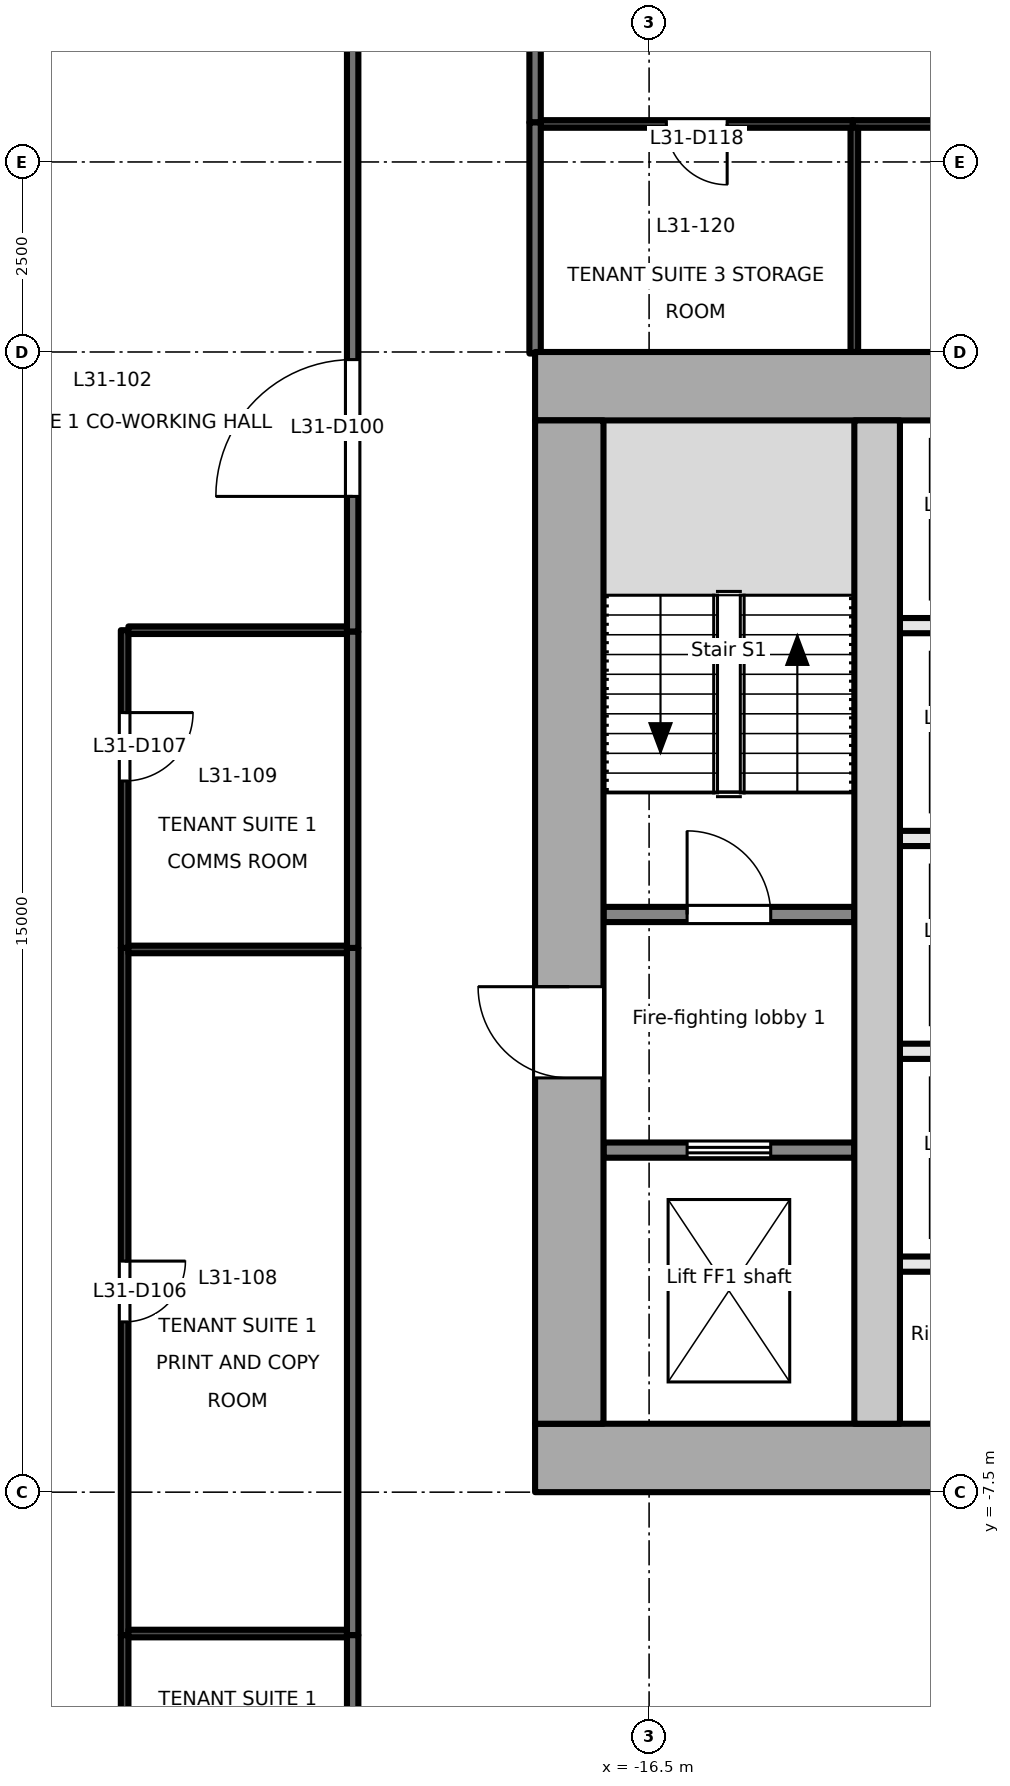
"""IFC4 building model, lengths in metres.
Left out: names, types, materials, properties, quantities, classifications, styles, units other than length and angle.
Written with IfcOpenShell. Run it as: python <this file> out.ifc"""

import sys

from ifc_helpers import new_model, si_unit, direction, frame, frame_2d, origin, place, context, subcontext, project, spatial, rectangle, extrude, element, fill, save


model = new_model("IFC4")
c1 = context("Model", 3, precision=1e-05, world=origin(), true_north=direction((0.0, 1.0)))
c2 = subcontext(c1, "Body", "Model", "MODEL_VIEW")
j1 = project(units=[si_unit("LENGTHUNIT", "METRE"), si_unit("PLANEANGLEUNIT", "RADIAN")], contexts=[c1])
p1 = place(None, origin())
s1 = spatial("IfcSite", under=j1, at=p1, CompositionType="ELEMENT")
p2 = place(p1, origin())
s2 = spatial("IfcBuilding", under=s1, at=p2, CompositionType="ELEMENT")
p3 = place(p2, frame((0.0, 0.0, 138.1)))
s3 = spatial("IfcBuildingStorey", under=s2, at=p3, CompositionType="ELEMENT", Elevation=138.1)
p4 = place(p3, frame((-18.0, -7.05, -0.2), z_axis=(0.0, 0.0, 1.0), x_axis=(1.0, 0.0, 0.0)))
e1 = element("IfcWall", 1, at=p4, inside=s3, PredefinedType="SHEAR", context=c2, shape_type="SweptSolid", body=[
    extrude(rectangle(XDim=36.0, YDim=0.9, at=frame_2d((18.0, 0.0))), origin(), (0.0, 0.0, 1.0), 4.0),
])
p5 = place(p4, frame((7.8, 0.0, 0.2)))
e2 = element("IfcOpeningElement", 2, at=p5, cuts=e1, PredefinedType="OPENING", context=c2, shape_type="SweptSolid", body=[
    extrude(rectangle(XDim=2.4, YDim=2.1, at=frame_2d((1.2, 1.05))), frame((0.0, 0.46, 0.0), z_axis=(0.0, -1.0, 0.0), x_axis=(1.0, 0.0, 0.0)), (0.0, 0.0, 1.0), 0.921),
])
p6 = place(p4, frame((17.4, 0.0, 0.2)))
e3 = element("IfcOpeningElement", 3, at=p6, cuts=e1, PredefinedType="OPENING", context=c2, shape_type="SweptSolid", body=[
    extrude(rectangle(XDim=1.2, YDim=2.1, at=frame_2d((0.6, 1.05))), frame((0.0, 0.46, 0.0), z_axis=(0.0, -1.0, 0.0), x_axis=(1.0, 0.0, 0.0)), (0.0, 0.0, 1.0), 0.921),
])
p7 = place(p4, frame((26.1, 0.0, 0.2)))
e4 = element("IfcOpeningElement", 4, at=p7, cuts=e1, PredefinedType="OPENING", context=c2, shape_type="SweptSolid", body=[
    extrude(rectangle(XDim=2.4, YDim=2.1, at=frame_2d((1.2, 1.05))), frame((0.0, 0.46, 0.0), z_axis=(0.0, -1.0, 0.0), x_axis=(1.0, 0.0, 0.0)), (0.0, 0.0, 1.0), 0.921),
])
p8 = place(p3, frame((-18.0, 7.05, -0.2), z_axis=(0.0, 0.0, 1.0), x_axis=(1.0, 0.0, 0.0)))
e5 = element("IfcWall", 5, at=p8, inside=s3, PredefinedType="SHEAR", context=c2, shape_type="SweptSolid", body=[
    extrude(rectangle(XDim=36.0, YDim=0.9, at=frame_2d((18.0, 0.0))), origin(), (0.0, 0.0, 1.0), 4.0),
])
p9 = place(p3, frame((-17.55, -6.6, -0.2), z_axis=(0.0, 0.0, 1.0), x_axis=(0.0, 1.0, 0.0)))
e6 = element("IfcWall", 6, at=p9, inside=s3, PredefinedType="SHEAR", context=c2, shape_type="SweptSolid", body=[
    extrude(rectangle(XDim=13.2, YDim=0.9, at=frame_2d((6.6, 0.0))), origin(), (0.0, 0.0, 1.0), 4.0),
])
p10 = place(p9, frame((4.55, 0.0, 0.2)))
e7 = element("IfcOpeningElement", 7, at=p10, cuts=e6, PredefinedType="OPENING", context=c2, shape_type="SweptSolid", body=[
    extrude(rectangle(XDim=1.2, YDim=2.1, at=frame_2d((0.6, 1.05))), frame((0.0, 0.46, 0.0), z_axis=(0.0, -1.0, 0.0), x_axis=(1.0, 0.0, 0.0)), (0.0, 0.0, 1.0), 0.921),
])
p11 = place(p3, frame((-13.5, -6.6, -0.2), z_axis=(0.0, 0.0, 1.0), x_axis=(0.0, 1.0, 0.0)))
e8 = element("IfcWall", 8, at=p11, inside=s3, PredefinedType="SHEAR", context=c2, shape_type="SweptSolid", body=[
    extrude(rectangle(XDim=13.2, YDim=0.6, at=frame_2d((6.6, 0.0))), origin(), (0.0, 0.0, 1.0), 4.0),
])
p12 = place(p3, frame((-17.1, -3.0, 0.0), z_axis=(0.0, 0.0, 1.0), x_axis=(1.0, 0.0, 0.0)))
e9 = element("IfcWall", 9, at=p12, inside=s3, PredefinedType="PARTITIONING", context=c2, shape_type="SweptSolid", body=[
    extrude(rectangle(XDim=3.3, YDim=0.2, at=frame_2d((1.65, 0.0))), origin(), (0.0, 0.0, 1.0), 3.8),
])
p13 = place(p12, frame((1.1, 0.0, 0.0)))
e10 = element("IfcOpeningElement", 10, at=p13, cuts=e9, PredefinedType="OPENING", context=c2, shape_type="SweptSolid", body=[
    extrude(rectangle(XDim=1.1, YDim=2.1, at=frame_2d((0.55, 1.05))), frame((0.0, 0.111, 0.0), z_axis=(0.0, -1.0, 0.0), x_axis=(1.0, 0.0, 0.0)), (0.0, 0.0, 1.0), 0.221),
])
p14 = place(p3, frame((-17.1, 0.1, 0.0), z_axis=(0.0, 0.0, 1.0), x_axis=(1.0, 0.0, 0.0)))
e11 = element("IfcWall", 11, at=p14, inside=s3, PredefinedType="PARTITIONING", context=c2, shape_type="SweptSolid", body=[
    extrude(rectangle(XDim=3.3, YDim=0.2, at=frame_2d((1.65, 0.0))), origin(), (0.0, 0.0, 1.0), 3.8),
])
p15 = place(p14, frame((1.1, 0.0, 0.0)))
e12 = element("IfcOpeningElement", 12, at=p15, cuts=e11, PredefinedType="OPENING", context=c2, shape_type="SweptSolid", body=[
    extrude(rectangle(XDim=1.1, YDim=2.1, at=frame_2d((0.55, 1.05))), frame((0.0, 0.111, 0.0), z_axis=(0.0, -1.0, 0.0), x_axis=(1.0, 0.0, 0.0)), (0.0, 0.0, 1.0), 0.221),
])
for number, where, z_axis, x_axis in (
    (13, (-13.2, -1.7, 0.0), (0.0, 0.0, 1.0), (1.0, 0.0, 0.0)),
    (14, (-13.2, 1.1, 0.0), (0.0, 0.0, 1.0), (1.0, 0.0, 0.0)),
    (15, (-13.2, 3.9, 0.0), (0.0, 0.0, 1.0), (1.0, 0.0, 0.0)),
    (16, (-13.2, -4.5, 0.0), (0.0, 0.0, 1.0), (1.0, 0.0, 0.0)),
):
    element("IfcWall", number, at=place(p3, frame(where, z_axis=z_axis, x_axis=x_axis)), inside=s3, PredefinedType="PARTITIONING", context=c2, shape_type="SweptSolid", body=[
        extrude(rectangle(XDim=2.3, YDim=0.2, at=frame_2d((1.15, 0.0))), origin(), (0.0, 0.0, 1.0), 3.8),
    ])
p16 = place(p3, frame((-20.4, 3.82, 0.0), z_axis=(0.0, 0.0, 1.0), x_axis=(0.0, 1.0, 0.0)))
e17 = element("IfcWall", 17, at=p16, inside=s3, PredefinedType="PARTITIONING", context=c2, shape_type="SweptSolid", body=[
    extrude(rectangle(XDim=8.42, YDim=0.15, at=frame_2d((4.21, 0.0))), origin(), (0.0, 0.0, 1.0), 3.3),
])
p17 = place(p16, frame((1.78, 0.0, 0.0)))
e18 = element("IfcOpeningElement", 18, at=p17, cuts=e17, PredefinedType="OPENING", context=c2, shape_type="SweptSolid", body=[
    extrude(rectangle(XDim=1.8, YDim=2.1, at=frame_2d((0.9, 1.05))), frame((0.0, 0.085, 0.0), z_axis=(0.0, -1.0, 0.0), x_axis=(1.0, 0.0, 0.0)), (0.0, 0.0, 1.0), 0.171),
])
p18 = place(p3, frame((-20.4, -12.34, 0.0), z_axis=(0.0, 0.0, 1.0), x_axis=(0.0, 1.0, 0.0)))
e19 = element("IfcWall", 19, at=p18, inside=s3, PredefinedType="PARTITIONING", context=c2, shape_type="SweptSolid", body=[
    extrude(rectangle(XDim=2.96, YDim=0.15, at=frame_2d((1.48, 0.0))), origin(), (0.0, 0.0, 1.0), 3.8),
])
p19 = place(p3, frame((-20.4, -9.38, 0.0), z_axis=(0.0, 0.0, 1.0), x_axis=(0.0, 1.0, 0.0)))
e20 = element("IfcWall", 20, at=p19, inside=s3, PredefinedType="PARTITIONING", context=c2, shape_type="SweptSolid", body=[
    extrude(rectangle(XDim=9.04, YDim=0.15, at=frame_2d((4.52, 0.0))), origin(), (0.0, 0.0, 1.0), 3.3),
])
p20 = place(p3, frame((-20.4, -0.34, 0.0), z_axis=(0.0, 0.0, 1.0), x_axis=(0.0, 1.0, 0.0)))
e21 = element("IfcWall", 21, at=p20, inside=s3, PredefinedType="PARTITIONING", context=c2, shape_type="SweptSolid", body=[
    extrude(rectangle(XDim=4.16, YDim=0.15, at=frame_2d((2.08, 0.0))), origin(), (0.0, 0.0, 1.0), 3.3),
])
p21 = place(p3, frame((-18.0, 12.24, 0.0), z_axis=(0.0, 0.0, 1.0), x_axis=(0.0, -1.0, 0.0)))
e22 = element("IfcWall", 22, at=p21, inside=s3, PredefinedType="PARTITIONING", context=c2, shape_type="SweptSolid", body=[
    extrude(rectangle(XDim=1.72, YDim=0.15, at=frame_2d((0.86, 0.0))), origin(), (0.0, 0.0, 1.0), 3.8),
])
p22 = place(p3, frame((-18.0, 10.52, 0.0), z_axis=(0.0, 0.0, 1.0), x_axis=(0.0, -1.0, 0.0)))
e23 = element("IfcWall", 23, at=p22, inside=s3, PredefinedType="PARTITIONING", context=c2, shape_type="SweptSolid", body=[
    extrude(rectangle(XDim=3.04, YDim=0.15, at=frame_2d((1.52, 0.0))), origin(), (0.0, 0.0, 1.0), 3.8),
])
p23 = place(p3, frame((-23.4, -9.38, 0.0), z_axis=(0.0, 0.0, 1.0), x_axis=(0.0, -1.0, 0.0)))
e24 = element("IfcWall", 24, at=p23, inside=s3, PredefinedType="PARTITIONING", context=c2, shape_type="SweptSolid", body=[
    extrude(rectangle(XDim=2.96, YDim=0.1, at=frame_2d((1.48, 0.0))), origin(), (0.0, 0.0, 1.0), 3.8),
])
p24 = place(p23, frame((1.412, 0.0, 0.0)))
e25 = element("IfcOpeningElement", 25, at=p24, cuts=e24, PredefinedType="OPENING", context=c2, shape_type="SweptSolid", body=[
    extrude(rectangle(XDim=0.8, YDim=2.1, at=frame_2d((0.4, 1.05))), frame((0.0, 0.061, 0.0), z_axis=(0.0, -1.0, 0.0), x_axis=(1.0, 0.0, 0.0)), (0.0, 0.0, 1.0), 0.121),
])
p25 = place(p3, frame((-23.4, -0.34, 0.0), z_axis=(0.0, 0.0, 1.0), x_axis=(0.0, -1.0, 0.0)))
e26 = element("IfcWall", 26, at=p25, inside=s3, PredefinedType="PARTITIONING", context=c2, shape_type="SweptSolid", body=[
    extrude(rectangle(XDim=9.04, YDim=0.1, at=frame_2d((4.52, 0.0))), origin(), (0.0, 0.0, 1.0), 3.3),
])
p26 = place(p25, frame((4.12, 0.0, 0.0)))
e27 = element("IfcOpeningElement", 27, at=p26, cuts=e26, PredefinedType="OPENING", context=c2, shape_type="SweptSolid", body=[
    extrude(rectangle(XDim=0.8, YDim=2.1, at=frame_2d((0.4, 1.05))), frame((0.0, 0.061, 0.0), z_axis=(0.0, -1.0, 0.0), x_axis=(1.0, 0.0, 0.0)), (0.0, 0.0, 1.0), 0.121),
])
p27 = place(p3, frame((-23.4, 3.84, 0.0), z_axis=(0.0, 0.0, 1.0), x_axis=(0.0, -1.0, 0.0)))
e28 = element("IfcWall", 28, at=p27, inside=s3, PredefinedType="PARTITIONING", context=c2, shape_type="SweptSolid", body=[
    extrude(rectangle(XDim=4.18, YDim=0.1, at=frame_2d((2.09, 0.0))), origin(), (0.0, 0.0, 1.0), 3.3),
])
p28 = place(p27, frame((1.084, 0.0, 0.0)))
e29 = element("IfcOpeningElement", 29, at=p28, cuts=e28, PredefinedType="OPENING", context=c2, shape_type="SweptSolid", body=[
    extrude(rectangle(XDim=0.9, YDim=2.1, at=frame_2d((0.45, 1.05))), frame((0.0, 0.061, 0.0), z_axis=(0.0, -1.0, 0.0), x_axis=(1.0, 0.0, 0.0)), (0.0, 0.0, 1.0), 0.121),
])
for number, where, z_axis, x_axis in (
    (30, (-20.475, 3.84, 0.0), (0.0, 0.0, 1.0), (-1.0, 0.0, 0.0)),
    (31, (-23.35, -9.36, 0.0), (0.0, 0.0, 1.0), (1.0, 0.0, 0.0)),
    (32, (-23.35, -0.36, 0.0), (0.0, 0.0, 1.0), (1.0, 0.0, 0.0)),
):
    element("IfcWall", number, at=place(p3, frame(where, z_axis=z_axis, x_axis=x_axis)), inside=s3, PredefinedType="PARTITIONING", context=c2, shape_type="SweptSolid", body=[
        extrude(rectangle(XDim=2.875, YDim=0.1, at=frame_2d((1.438, 0.0))), origin(), (0.0, 0.0, 1.0), 3.8),
    ])
p29 = place(p3, frame((-13.82, 10.5, 0.0), z_axis=(0.0, 0.0, 1.0), x_axis=(-1.0, 0.0, 0.0)))
e33 = element("IfcWall", 33, at=p29, inside=s3, PredefinedType="PARTITIONING", context=c2, shape_type="SweptSolid", body=[
    extrude(rectangle(XDim=4.105, YDim=0.1, at=frame_2d((2.052, 0.0))), origin(), (0.0, 0.0, 1.0), 3.8),
])
p30 = place(p29, frame((1.653, 0.0, 0.0)))
e34 = element("IfcOpeningElement", 34, at=p30, cuts=e33, PredefinedType="OPENING", context=c2, shape_type="SweptSolid", body=[
    extrude(rectangle(XDim=0.8, YDim=2.1, at=frame_2d((0.4, 1.05))), frame((0.0, 0.061, 0.0), z_axis=(0.0, -1.0, 0.0), x_axis=(1.0, 0.0, 0.0)), (0.0, 0.0, 1.0), 0.121),
])
p31 = place(p3, frame((-5.98, 10.5, 0.0), z_axis=(0.0, 0.0, 1.0), x_axis=(-1.0, 0.0, 0.0)))
e35 = element("IfcWall", 35, at=p31, inside=s3, PredefinedType="PARTITIONING", context=c2, shape_type="SweptSolid", body=[
    extrude(rectangle(XDim=7.84, YDim=0.1, at=frame_2d((3.92, 0.0))), origin(), (0.0, 0.0, 1.0), 3.5),
])
p32 = place(p31, frame((2.182, 0.0, 0.0)))
e36 = element("IfcOpeningElement", 36, at=p32, cuts=e35, PredefinedType="OPENING", context=c2, shape_type="SweptSolid", body=[
    extrude(rectangle(XDim=0.9, YDim=2.1, at=frame_2d((0.45, 1.05))), frame((0.0, 0.061, 0.0), z_axis=(0.0, -1.0, 0.0), x_axis=(1.0, 0.0, 0.0)), (0.0, 0.0, 1.0), 0.121),
])
p33 = place(p3, frame((-13.8, 10.45, 0.0), z_axis=(0.0, 0.0, 1.0), x_axis=(0.0, -1.0, 0.0)))
e37 = element("IfcWall", 37, at=p33, inside=s3, PredefinedType="PARTITIONING", context=c2, shape_type="SweptSolid", body=[
    extrude(rectangle(XDim=2.95, YDim=0.1, at=frame_2d((1.475, 0.0))), origin(), (0.0, 0.0, 1.0), 3.8),
])
p34 = place(p13, origin())
e38 = element("IfcDoor", 38, at=p34, inside=s3, OperationType="DOUBLE_DOOR_SLIDING", PredefinedType="DOOR", context=c2, shape_type="SweptSolid", body=[
    extrude(rectangle(XDim=1.1, YDim=2.1, at=frame_2d((0.55, 1.05))), frame((0.0, 0.025, 0.0), z_axis=(0.0, -1.0, 0.0), x_axis=(1.0, 0.0, 0.0)), (0.0, 0.0, 1.0), 0.05),
])
fill(e10, e38)
p35 = place(p10, origin())
e39 = element("IfcDoor", 39, at=p35, inside=s3, OperationType="SINGLE_SWING_RIGHT", PredefinedType="DOOR", context=c2, shape_type="SweptSolid", body=[
    extrude(rectangle(XDim=1.2, YDim=2.1, at=frame_2d((0.6, 1.05))), frame((0.0, 0.025, 0.0), z_axis=(0.0, -1.0, 0.0), x_axis=(1.0, 0.0, 0.0)), (0.0, 0.0, 1.0), 0.05),
])
fill(e7, e39)
p36 = place(p15, origin())
e40 = element("IfcDoor", 40, at=p36, inside=s3, OperationType="SINGLE_SWING_LEFT", PredefinedType="DOOR", context=c2, shape_type="SweptSolid", body=[
    extrude(rectangle(XDim=1.1, YDim=2.1, at=frame_2d((0.55, 1.05))), frame((0.0, 0.025, 0.0), z_axis=(0.0, -1.0, 0.0), x_axis=(1.0, 0.0, 0.0)), (0.0, 0.0, 1.0), 0.05),
])
fill(e12, e40)
p37 = place(p17, origin())
e41 = element("IfcDoor", 41, at=p37, inside=s3, OperationType="DOUBLE_DOOR_SINGLE_SWING", PredefinedType="DOOR", context=c2, shape_type="SweptSolid", body=[
    extrude(rectangle(XDim=1.8, YDim=2.1, at=frame_2d((0.9, 1.05))), frame((0.0, 0.025, 0.0), z_axis=(0.0, -1.0, 0.0), x_axis=(1.0, 0.0, 0.0)), (0.0, 0.0, 1.0), 0.05),
])
fill(e18, e41)
p38 = place(p26, origin())
e42 = element("IfcDoor", 42, at=p38, inside=s3, OperationType="SINGLE_SWING_LEFT", PredefinedType="DOOR", context=c2, shape_type="SweptSolid", body=[
    extrude(rectangle(XDim=0.8, YDim=2.1, at=frame_2d((0.4, 1.05))), frame((0.0, 0.025, 0.0), z_axis=(0.0, -1.0, 0.0), x_axis=(1.0, 0.0, 0.0)), (0.0, 0.0, 1.0), 0.05),
])
fill(e27, e42)
p39 = place(p28, origin())
e43 = element("IfcDoor", 43, at=p39, inside=s3, OperationType="SINGLE_SWING_LEFT", PredefinedType="DOOR", context=c2, shape_type="SweptSolid", body=[
    extrude(rectangle(XDim=0.9, YDim=2.1, at=frame_2d((0.45, 1.05))), frame((0.0, 0.025, 0.0), z_axis=(0.0, -1.0, 0.0), x_axis=(1.0, 0.0, 0.0)), (0.0, 0.0, 1.0), 0.05),
])
fill(e29, e43)
p40 = place(p30, origin())
e44 = element("IfcDoor", 44, at=p40, inside=s3, OperationType="SINGLE_SWING_LEFT", PredefinedType="DOOR", context=c2, shape_type="SweptSolid", body=[
    extrude(rectangle(XDim=0.8, YDim=2.1, at=frame_2d((0.4, 1.05))), frame((0.0, 0.025, 0.0), z_axis=(0.0, -1.0, 0.0), x_axis=(1.0, 0.0, 0.0)), (0.0, 0.0, 1.0), 0.05),
])
fill(e34, e44)
save(model, sys.argv[1])
